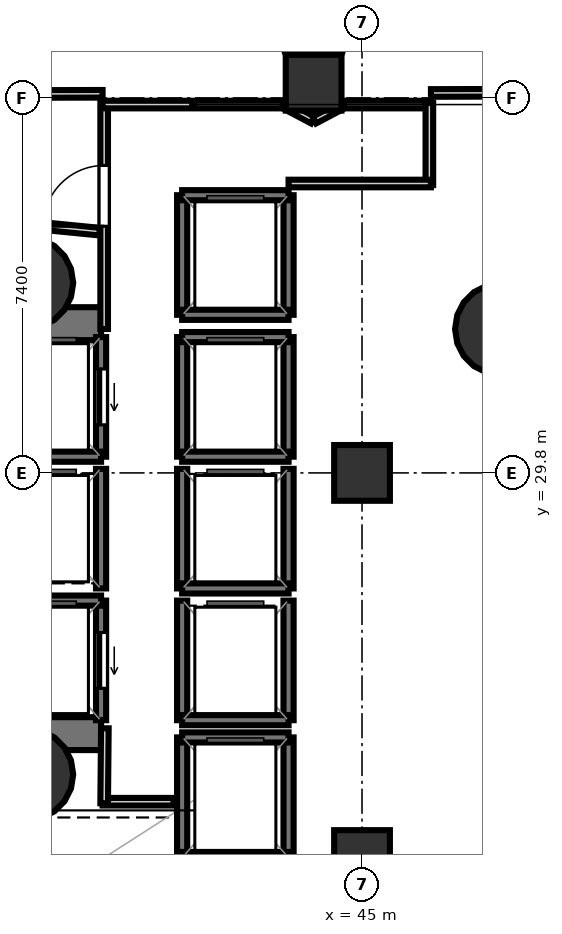
"""IFC4 building model, lengths in metres.
Left out: names, types, materials, properties, quantities, classifications, styles, units other than length and angle.
Written with IfcOpenShell. Run it as: python <this file> out.ifc"""

import sys

from ifc_helpers import new_model, si_unit, direction, frame, frame_2d, origin, origin_2d, place, context, subcontext, project, spatial, rectangle, hollow_circle, extrude, element, fill, save


model = new_model("IFC4")
c1 = context("Model", 3, precision=1e-05, world=origin(), true_north=direction((0.0, 1.0)))
c2 = subcontext(c1, "Body", "Model", "MODEL_VIEW")
j1 = project(units=[si_unit("LENGTHUNIT", "METRE"), si_unit("PLANEANGLEUNIT", "RADIAN")], contexts=[c1])
p1 = place(None, origin())
s1 = spatial("IfcSite", under=j1, at=p1, CompositionType="ELEMENT")
p2 = place(p1, origin())
s2 = spatial("IfcBuilding", under=s1, at=p2, CompositionType="ELEMENT")
p3 = place(p2, frame((0.0, 0.0, 6.0)))
s3 = spatial("IfcBuildingStorey", under=s2, at=p3, CompositionType="ELEMENT", Elevation=6.0)
p4 = place(p3, frame((29.13, 32.745, 0.0), z_axis=(0.0, 0.0, 1.0), x_axis=(1.0, 0.0, 0.0)))
e1 = element("IfcWall", 1, at=p4, inside=s3, PredefinedType="SHEAR", context=c2, shape_type="SweptSolid", body=[
    extrude(rectangle(XDim=10.72, YDim=0.65, at=frame_2d((5.36, 0.0))), origin(), (0.0, 0.0, 1.0), 4.78),
])
p5 = place(p4, frame((1.095, 0.0, 0.0)))
e2 = element("IfcOpeningElement", 2, at=p5, cuts=e1, PredefinedType="OPENING", context=c2, shape_type="SweptSolid", body=[
    extrude(rectangle(XDim=1.25, YDim=2.15, at=frame_2d((0.625, 1.075))), frame((0.0, 0.335, 0.0), z_axis=(0.0, -1.0, 0.0), x_axis=(1.0, 0.0, 0.0)), (0.0, 0.0, 1.0), 0.67),
])
p6 = place(p3, frame((29.13, 24.655, 0.0), z_axis=(0.0, 0.0, 1.0), x_axis=(1.0, 0.0, 0.0)))
e3 = element("IfcWall", 3, at=p6, inside=s3, PredefinedType="SHEAR", context=c2, shape_type="SweptSolid", body=[
    extrude(rectangle(XDim=10.72, YDim=0.65, at=frame_2d((5.36, 0.0))), origin(), (0.0, 0.0, 1.0), 4.78),
])
p7 = place(p6, frame((0.895, 0.0, 0.0)))
e4 = element("IfcOpeningElement", 4, at=p7, cuts=e3, PredefinedType="OPENING", context=c2, shape_type="SweptSolid", body=[
    extrude(rectangle(XDim=1.25, YDim=2.15, at=frame_2d((0.625, 1.075))), frame((0.0, 0.335, 0.0), z_axis=(0.0, -1.0, 0.0), x_axis=(1.0, 0.0, 0.0)), (0.0, 0.0, 1.0), 0.67),
])
for number, where, z_axis, x_axis in (
    (5, (38.4, 33.55, 0.0), (0.0, 0.0, 1.0), (1.0, 0.0, 0.0)),
    (6, (38.4, 23.85, 0.0), (0.0, 0.0, 1.0), (1.0, 0.0, 0.0)),
    (7, (47.736, 32.637, 0.0), (0.0, 0.0, 1.0), (1.0, 0.0, 0.0)),
):
    element("IfcColumn", number, at=place(p3, frame(where, z_axis=z_axis, x_axis=x_axis)), inside=s3, PredefinedType="COLUMN", context=c2, shape_type="SweptSolid", body=[
        extrude(hollow_circle(Radius=0.9, WallThickness=0.045, at=origin_2d()), origin(), (0.0, 0.0, 1.0), 5.0),
    ])
for number, where, z_axis, x_axis in (
    (8, (44.045, 37.5, 0.0), (0.0, 0.0, 1.0), (1.0, 0.0, 0.0)),
    (9, (45.0, 22.2, 0.0), (0.0, 0.0, 1.0), (1.0, 0.0, 0.0)),
    (10, (45.0, 29.8, 0.0), (0.0, 0.0, 1.0), (1.0, 0.0, 0.0)),
):
    element("IfcColumn", number, at=place(p3, frame(where, z_axis=z_axis, x_axis=x_axis)), inside=s3, PredefinedType="COLUMN", context=c2, shape_type="SweptSolid", body=[
        extrude(rectangle(XDim=1.1, YDim=1.1, at=origin_2d()), origin(), (0.0, 0.0, 1.0), 5.0),
    ])
p8 = place(p3, frame((39.85, 30.12, 0.0), z_axis=(0.0, 0.0, 1.0), x_axis=(0.0, 1.0, 0.0)))
e11 = element("IfcWall", 11, at=p8, inside=s3, PredefinedType="SOLIDWALL", context=c2, shape_type="SweptSolid", body=[
    extrude(rectangle(XDim=2.36, YDim=0.2, at=frame_2d((1.18, 0.0))), origin(), (0.0, 0.0, 1.0), 4.78),
])
p9 = place(p8, frame((0.63, 0.0, 0.0)))
e12 = element("IfcOpeningElement", 12, at=p9, cuts=e11, PredefinedType="OPENING", context=c2, shape_type="SweptSolid", body=[
    extrude(rectangle(XDim=1.1, YDim=2.15, at=frame_2d((0.55, 1.075))), frame((0.0, 0.11, 0.0), z_axis=(0.0, -1.0, 0.0), x_axis=(1.0, 0.0, 0.0)), (0.0, 0.0, 1.0), 0.22),
])
p10 = place(p3, frame((37.75, 30.12, 0.0), z_axis=(0.0, 0.0, 1.0), x_axis=(1.0, 0.0, 0.0)))
e13 = element("IfcWall", 13, at=p10, inside=s3, PredefinedType="SOLIDWALL", context=c2, shape_type="SweptSolid", body=[
    extrude(rectangle(XDim=2.1, YDim=0.2, at=frame_2d((1.05, 0.0))), origin(), (0.0, 0.0, 1.0), 4.78),
])
p11 = place(p3, frame((39.85, 24.92, 0.0), z_axis=(0.0, 0.0, 1.0), x_axis=(0.0, 1.0, 0.0)))
e14 = element("IfcWall", 14, at=p11, inside=s3, PredefinedType="SOLIDWALL", context=c2, shape_type="SweptSolid", body=[
    extrude(rectangle(XDim=2.36, YDim=0.2, at=frame_2d((1.18, 0.0))), origin(), (0.0, 0.0, 1.0), 4.78),
])
p12 = place(p11, frame((0.63, 0.0, 0.0)))
e15 = element("IfcOpeningElement", 15, at=p12, cuts=e14, PredefinedType="OPENING", context=c2, shape_type="SweptSolid", body=[
    extrude(rectangle(XDim=1.1, YDim=2.15, at=frame_2d((0.55, 1.075))), frame((0.0, 0.11, 0.0), z_axis=(0.0, -1.0, 0.0), x_axis=(1.0, 0.0, 0.0)), (0.0, 0.0, 1.0), 0.22),
])
p13 = place(p3, frame((37.75, 27.28, 0.0), z_axis=(0.0, 0.0, 1.0), x_axis=(1.0, 0.0, 0.0)))
e16 = element("IfcWall", 16, at=p13, inside=s3, PredefinedType="SOLIDWALL", context=c2, shape_type="SweptSolid", body=[
    extrude(rectangle(XDim=2.1, YDim=0.2, at=frame_2d((1.05, 0.0))), origin(), (0.0, 0.0, 1.0), 4.78),
])
for number, where, z_axis, x_axis in (
    (17, (43.55, 30.12, 0.0), (0.0, 0.0, 1.0), (0.0, 1.0, 0.0)),
    (18, (41.45, 30.12, 0.0), (0.0, 0.0, 1.0), (0.0, 1.0, 0.0)),
):
    element("IfcWall", number, at=place(p3, frame(where, z_axis=z_axis, x_axis=x_axis)), inside=s3, PredefinedType="SOLIDWALL", context=c2, shape_type="SweptSolid", body=[
        extrude(rectangle(XDim=2.36, YDim=0.2, at=frame_2d((1.18, 0.0))), origin(), (0.0, 0.0, 1.0), 4.78),
    ])
for number, where, z_axis, x_axis in (
    (19, (41.45, 32.48, 0.0), (0.0, 0.0, 1.0), (1.0, 0.0, 0.0)),
    (20, (41.45, 30.12, 0.0), (0.0, 0.0, 1.0), (1.0, 0.0, 0.0)),
):
    element("IfcWall", number, at=place(p3, frame(where, z_axis=z_axis, x_axis=x_axis)), inside=s3, PredefinedType="SOLIDWALL", context=c2, shape_type="SweptSolid", body=[
        extrude(rectangle(XDim=2.1, YDim=0.2, at=frame_2d((1.05, 0.0))), origin(), (0.0, 0.0, 1.0), 4.78),
    ])
for number, where, z_axis, x_axis in (
    (21, (43.55, 27.52, 0.0), (0.0, 0.0, 1.0), (0.0, 1.0, 0.0)),
    (22, (41.45, 27.52, 0.0), (0.0, 0.0, 1.0), (0.0, 1.0, 0.0)),
):
    element("IfcWall", number, at=place(p3, frame(where, z_axis=z_axis, x_axis=x_axis)), inside=s3, PredefinedType="SOLIDWALL", context=c2, shape_type="SweptSolid", body=[
        extrude(rectangle(XDim=2.36, YDim=0.2, at=frame_2d((1.18, 0.0))), origin(), (0.0, 0.0, 1.0), 4.78),
    ])
p14 = place(p3, frame((41.45, 27.52, 0.0), z_axis=(0.0, 0.0, 1.0), x_axis=(1.0, 0.0, 0.0)))
e23 = element("IfcWall", 23, at=p14, inside=s3, PredefinedType="SOLIDWALL", context=c2, shape_type="SweptSolid", body=[
    extrude(rectangle(XDim=2.1, YDim=0.2, at=frame_2d((1.05, 0.0))), origin(), (0.0, 0.0, 1.0), 4.78),
])
for number, where, z_axis, x_axis in (
    (24, (43.55, 24.92, 0.0), (0.0, 0.0, 1.0), (0.0, 1.0, 0.0)),
    (25, (41.45, 24.92, 0.0), (0.0, 0.0, 1.0), (0.0, 1.0, 0.0)),
):
    element("IfcWall", number, at=place(p3, frame(where, z_axis=z_axis, x_axis=x_axis)), inside=s3, PredefinedType="SOLIDWALL", context=c2, shape_type="SweptSolid", body=[
        extrude(rectangle(XDim=2.36, YDim=0.2, at=frame_2d((1.18, 0.0))), origin(), (0.0, 0.0, 1.0), 4.78),
    ])
p15 = place(p3, frame((41.45, 24.92, 0.0), z_axis=(0.0, 0.0, 1.0), x_axis=(1.0, 0.0, 0.0)))
e26 = element("IfcWall", 26, at=p15, inside=s3, PredefinedType="SOLIDWALL", context=c2, shape_type="SweptSolid", body=[
    extrude(rectangle(XDim=2.1, YDim=0.2, at=frame_2d((1.05, 0.0))), origin(), (0.0, 0.0, 1.0), 4.78),
])
p16 = place(p3, frame((39.85, 27.52, 0.0), z_axis=(0.0, 0.0, 1.0), x_axis=(0.0, 1.0, 0.0)))
e27 = element("IfcWall", 27, at=p16, inside=s3, PredefinedType="SOLIDWALL", context=c2, shape_type="SweptSolid", body=[
    extrude(rectangle(XDim=2.36, YDim=0.2, at=frame_2d((1.18, 0.0))), origin(), (0.0, 0.0, 1.0), 4.78),
])
for number, where, z_axis, x_axis in (
    (28, (43.55, 22.22, 0.0), (0.0, 0.0, 1.0), (0.0, 1.0, 0.0)),
    (29, (41.45, 22.22, 0.0), (0.0, 0.0, 1.0), (0.0, 1.0, 0.0)),
):
    element("IfcWall", number, at=place(p3, frame(where, z_axis=z_axis, x_axis=x_axis)), inside=s3, PredefinedType="SOLIDWALL", context=c2, shape_type="SweptSolid", body=[
        extrude(rectangle(XDim=2.36, YDim=0.2, at=frame_2d((1.18, 0.0))), origin(), (0.0, 0.0, 1.0), 4.78),
    ])
for number, where, z_axis, x_axis in (
    (30, (41.45, 24.58, 0.0), (0.0, 0.0, 1.0), (1.0, 0.0, 0.0)),
    (31, (41.45, 22.22, 0.0), (0.0, 0.0, 1.0), (1.0, 0.0, 0.0)),
):
    element("IfcWall", number, at=place(p3, frame(where, z_axis=z_axis, x_axis=x_axis)), inside=s3, PredefinedType="SOLIDWALL", context=c2, shape_type="SweptSolid", body=[
        extrude(rectangle(XDim=2.1, YDim=0.2, at=frame_2d((1.05, 0.0))), origin(), (0.0, 0.0, 1.0), 4.78),
    ])
for number, where, z_axis, x_axis in (
    (32, (43.55, 32.92, 0.0), (0.0, 0.0, 1.0), (0.0, 1.0, 0.0)),
    (33, (41.45, 32.92, 0.0), (0.0, 0.0, 1.0), (0.0, 1.0, 0.0)),
):
    element("IfcWall", number, at=place(p3, frame(where, z_axis=z_axis, x_axis=x_axis)), inside=s3, PredefinedType="SOLIDWALL", context=c2, shape_type="SweptSolid", body=[
        extrude(rectangle(XDim=2.36, YDim=0.2, at=frame_2d((1.18, 0.0))), origin(), (0.0, 0.0, 1.0), 4.78),
    ])
for number, where, z_axis, x_axis in (
    (34, (41.45, 35.28, 0.0), (0.0, 0.0, 1.0), (1.0, 0.0, 0.0)),
    (35, (41.45, 32.92, 0.0), (0.0, 0.0, 1.0), (1.0, 0.0, 0.0)),
):
    element("IfcWall", number, at=place(p3, frame(where, z_axis=z_axis, x_axis=x_axis)), inside=s3, PredefinedType="SOLIDWALL", context=c2, shape_type="SweptSolid", body=[
        extrude(rectangle(XDim=2.1, YDim=0.2, at=frame_2d((1.05, 0.0))), origin(), (0.0, 0.0, 1.0), 4.78),
    ])
p17 = place(p3, frame((39.911, 32.64, 0.0), z_axis=(0.0, 0.0, 1.0), x_axis=(0.0, 1.0, 0.0)))
e36 = element("IfcWall", 36, at=p17, inside=s3, PredefinedType="PARTITIONING", context=c2, shape_type="SweptSolid", body=[
    extrude(rectangle(XDim=4.46, YDim=0.15, at=frame_2d((2.23, 0.0))), origin(), (0.0, 0.0, 1.0), 4.1),
])
p18 = place(p17, frame((2.028, 0.0, 0.0)))
e37 = element("IfcOpeningElement", 37, at=p18, cuts=e36, PredefinedType="OPENING", context=c2, shape_type="SweptSolid", body=[
    extrude(rectangle(XDim=1.2, YDim=2.15, at=frame_2d((0.6, 1.075))), frame((0.0, 0.085, 0.0), z_axis=(0.0, -1.0, 0.0), x_axis=(1.0, 0.0, 0.0)), (0.0, 0.0, 1.0), 0.17),
])
p19 = place(p3, frame((39.88, 37.069, 0.0), z_axis=(0.0, 0.0, 1.0), x_axis=(1.0, 0.0, 0.0)))
e38 = element("IfcWall", 38, at=p19, inside=s3, PredefinedType="PARTITIONING", context=c2, shape_type="SweptSolid", body=[
    extrude(rectangle(XDim=3.579, YDim=0.15, at=frame_2d((1.79, 0.0))), origin(), (0.0, 0.0, 1.0), 4.1),
])
p20 = place(p3, frame((43.444, 37.073, 0.0), z_axis=(0.0, 0.0, 1.0), x_axis=(0.883949192033, -0.467582961521, 0.0)))
e39 = element("IfcWall", 39, at=p20, inside=s3, PredefinedType="PARTITIONING", context=c2, shape_type="SweptSolid", body=[
    extrude(rectangle(XDim=0.663, YDim=0.15, at=frame_2d((0.331, 0.0))), origin(), (0.0, 0.0, 1.0), 4.1),
])
p21 = place(p3, frame((44.059, 36.763, 0.0), z_axis=(0.0, 0.0, 1.0), x_axis=(0.884029711754, 0.46743071009, 0.0)))
e40 = element("IfcWall", 40, at=p21, inside=s3, PredefinedType="PARTITIONING", context=c2, shape_type="SweptSolid", body=[
    extrude(rectangle(XDim=0.663, YDim=0.15, at=frame_2d((0.332, 0.0))), origin(), (0.0, 0.0, 1.0), 4.1),
])
p22 = place(p3, frame((44.63, 37.069, 0.0), z_axis=(0.0, 0.0, 1.0), x_axis=(1.0, 0.0, 0.0)))
e41 = element("IfcWall", 41, at=p22, inside=s3, PredefinedType="PARTITIONING", context=c2, shape_type="SweptSolid", body=[
    extrude(rectangle(XDim=1.73, YDim=0.15, at=frame_2d((0.865, 0.0))), origin(), (0.0, 0.0, 1.0), 4.1),
])
p23 = place(p3, frame((46.329, 37.1, 0.0), z_axis=(0.0, 0.0, 1.0), x_axis=(0.0, -1.0, 0.0)))
e42 = element("IfcWall", 42, at=p23, inside=s3, PredefinedType="PARTITIONING", context=c2, shape_type="SweptSolid", body=[
    extrude(rectangle(XDim=1.62, YDim=0.15, at=frame_2d((0.81, 0.0))), origin(), (0.0, 0.0, 1.0), 4.1),
])
p24 = place(p3, frame((46.36, 35.511, 0.0), z_axis=(0.0, 0.0, 1.0), x_axis=(-1.0, 0.0, 0.0)))
e43 = element("IfcWall", 43, at=p24, inside=s3, PredefinedType="PARTITIONING", context=c2, shape_type="SweptSolid", body=[
    extrude(rectangle(XDim=2.81, YDim=0.15, at=frame_2d((1.405, 0.0))), origin(), (0.0, 0.0, 1.0), 4.1),
])
p25 = place(p3, frame((41.28, 23.311, 0.0), z_axis=(0.0, 0.0, 1.0), x_axis=(-1.0, 0.0, 0.0)))
e44 = element("IfcWall", 44, at=p25, inside=s3, PredefinedType="PARTITIONING", context=c2, shape_type="SweptSolid", body=[
    extrude(rectangle(XDim=1.4, YDim=0.15, at=frame_2d((0.7, 0.0))), origin(), (0.0, 0.0, 1.0), 4.1),
])
p26 = place(p3, frame((39.911, 23.28, 0.0), z_axis=(0.0, 0.0, 1.0), x_axis=(0.009397771291, 0.999955839972, 0.0)))
e45 = element("IfcWall", 45, at=p26, inside=s3, PredefinedType="PARTITIONING", context=c2, shape_type="SweptSolid", body=[
    extrude(rectangle(XDim=1.481, YDim=0.15, at=frame_2d((0.74, 0.0))), origin(), (0.0, 0.0, 1.0), 4.1),
])
p27 = place(p3, frame((51.046, 37.31, 0.0), z_axis=(0.0, 0.0, 1.0), x_axis=(-0.999996873061, -0.002500773674, 0.0)))
e46 = element("IfcWall", 46, at=p27, inside=s3, PredefinedType="PARTITIONING", context=c2, shape_type="SweptSolid", body=[
    extrude(rectangle(XDim=4.686, YDim=0.15, at=frame_2d((2.343, 0.0))), origin(), (0.0, 0.0, 1.0), 4.1),
])
for number, where, z_axis, x_axis in (
    (47, (44.601, 38.073, 0.0), (0.0, 0.0, 1.0), (-0.924, 0.383, 0.0)),
    (48, (44.033, 38.299, 0.0), (0.0, 0.0, 1.0), (-0.924, -0.383, 0.0)),
):
    element("IfcWall", number, at=place(p3, frame(where, z_axis=z_axis, x_axis=x_axis)), inside=s3, PredefinedType="PARTITIONING", context=c2, shape_type="SweptSolid", body=[
        extrude(rectangle(XDim=0.589, YDim=0.15, at=frame_2d((0.295, 0.0))), origin(), (0.0, 0.0, 1.0), 4.1),
    ])
p28 = place(p3, frame((39.88, 37.281, 0.0), z_axis=(0.0, 0.0, 1.0), x_axis=(-0.999997273456, -0.002335183143, 0.0)))
e49 = element("IfcWall", 49, at=p28, inside=s3, PredefinedType="PARTITIONING", context=c2, shape_type="SweptSolid", body=[
    extrude(rectangle(XDim=1.359, YDim=0.15, at=frame_2d((0.68, 0.0))), origin(), (0.0, 0.0, 1.0), 4.1),
])
p29 = place(p3, frame((39.821, 34.561, 0.0), z_axis=(0.0, 0.0, 1.0), x_axis=(-0.995195288054, 0.09790984953, 0.0)))
e50 = element("IfcWall", 50, at=p29, inside=s3, PredefinedType="PARTITIONING", context=c2, shape_type="SweptSolid", body=[
    extrude(rectangle(XDim=1.653, YDim=0.15, at=frame_2d((0.827, 0.0))), origin(), (0.0, 0.0, 1.0), 4.1),
])
p30 = place(p9, origin())
e51 = element("IfcDoor", 51, at=p30, inside=s3, OperationType="SLIDING_TO_LEFT", PredefinedType="DOOR", context=c2, shape_type="SweptSolid", body=[
    extrude(rectangle(XDim=1.1, YDim=2.15, at=frame_2d((0.55, 1.075))), frame((0.0, 0.025, 0.0), z_axis=(0.0, -1.0, 0.0), x_axis=(1.0, 0.0, 0.0)), (0.0, 0.0, 1.0), 0.05),
])
fill(e12, e51)
p31 = place(p12, origin())
e52 = element("IfcDoor", 52, at=p31, inside=s3, OperationType="SLIDING_TO_LEFT", PredefinedType="DOOR", context=c2, shape_type="SweptSolid", body=[
    extrude(rectangle(XDim=1.1, YDim=2.15, at=frame_2d((0.55, 1.075))), frame((0.0, 0.025, 0.0), z_axis=(0.0, -1.0, 0.0), x_axis=(1.0, 0.0, 0.0)), (0.0, 0.0, 1.0), 0.05),
])
fill(e15, e52)
p32 = place(p18, origin())
e53 = element("IfcDoor", 53, at=p32, inside=s3, OperationType="SINGLE_SWING_LEFT", PredefinedType="DOOR", context=c2, shape_type="SweptSolid", body=[
    extrude(rectangle(XDim=1.2, YDim=2.15, at=frame_2d((0.6, 1.075))), frame((0.0, 0.025, 0.0), z_axis=(0.0, -1.0, 0.0), x_axis=(1.0, 0.0, 0.0)), (0.0, 0.0, 1.0), 0.05),
])
fill(e37, e53)
save(model, sys.argv[1])
